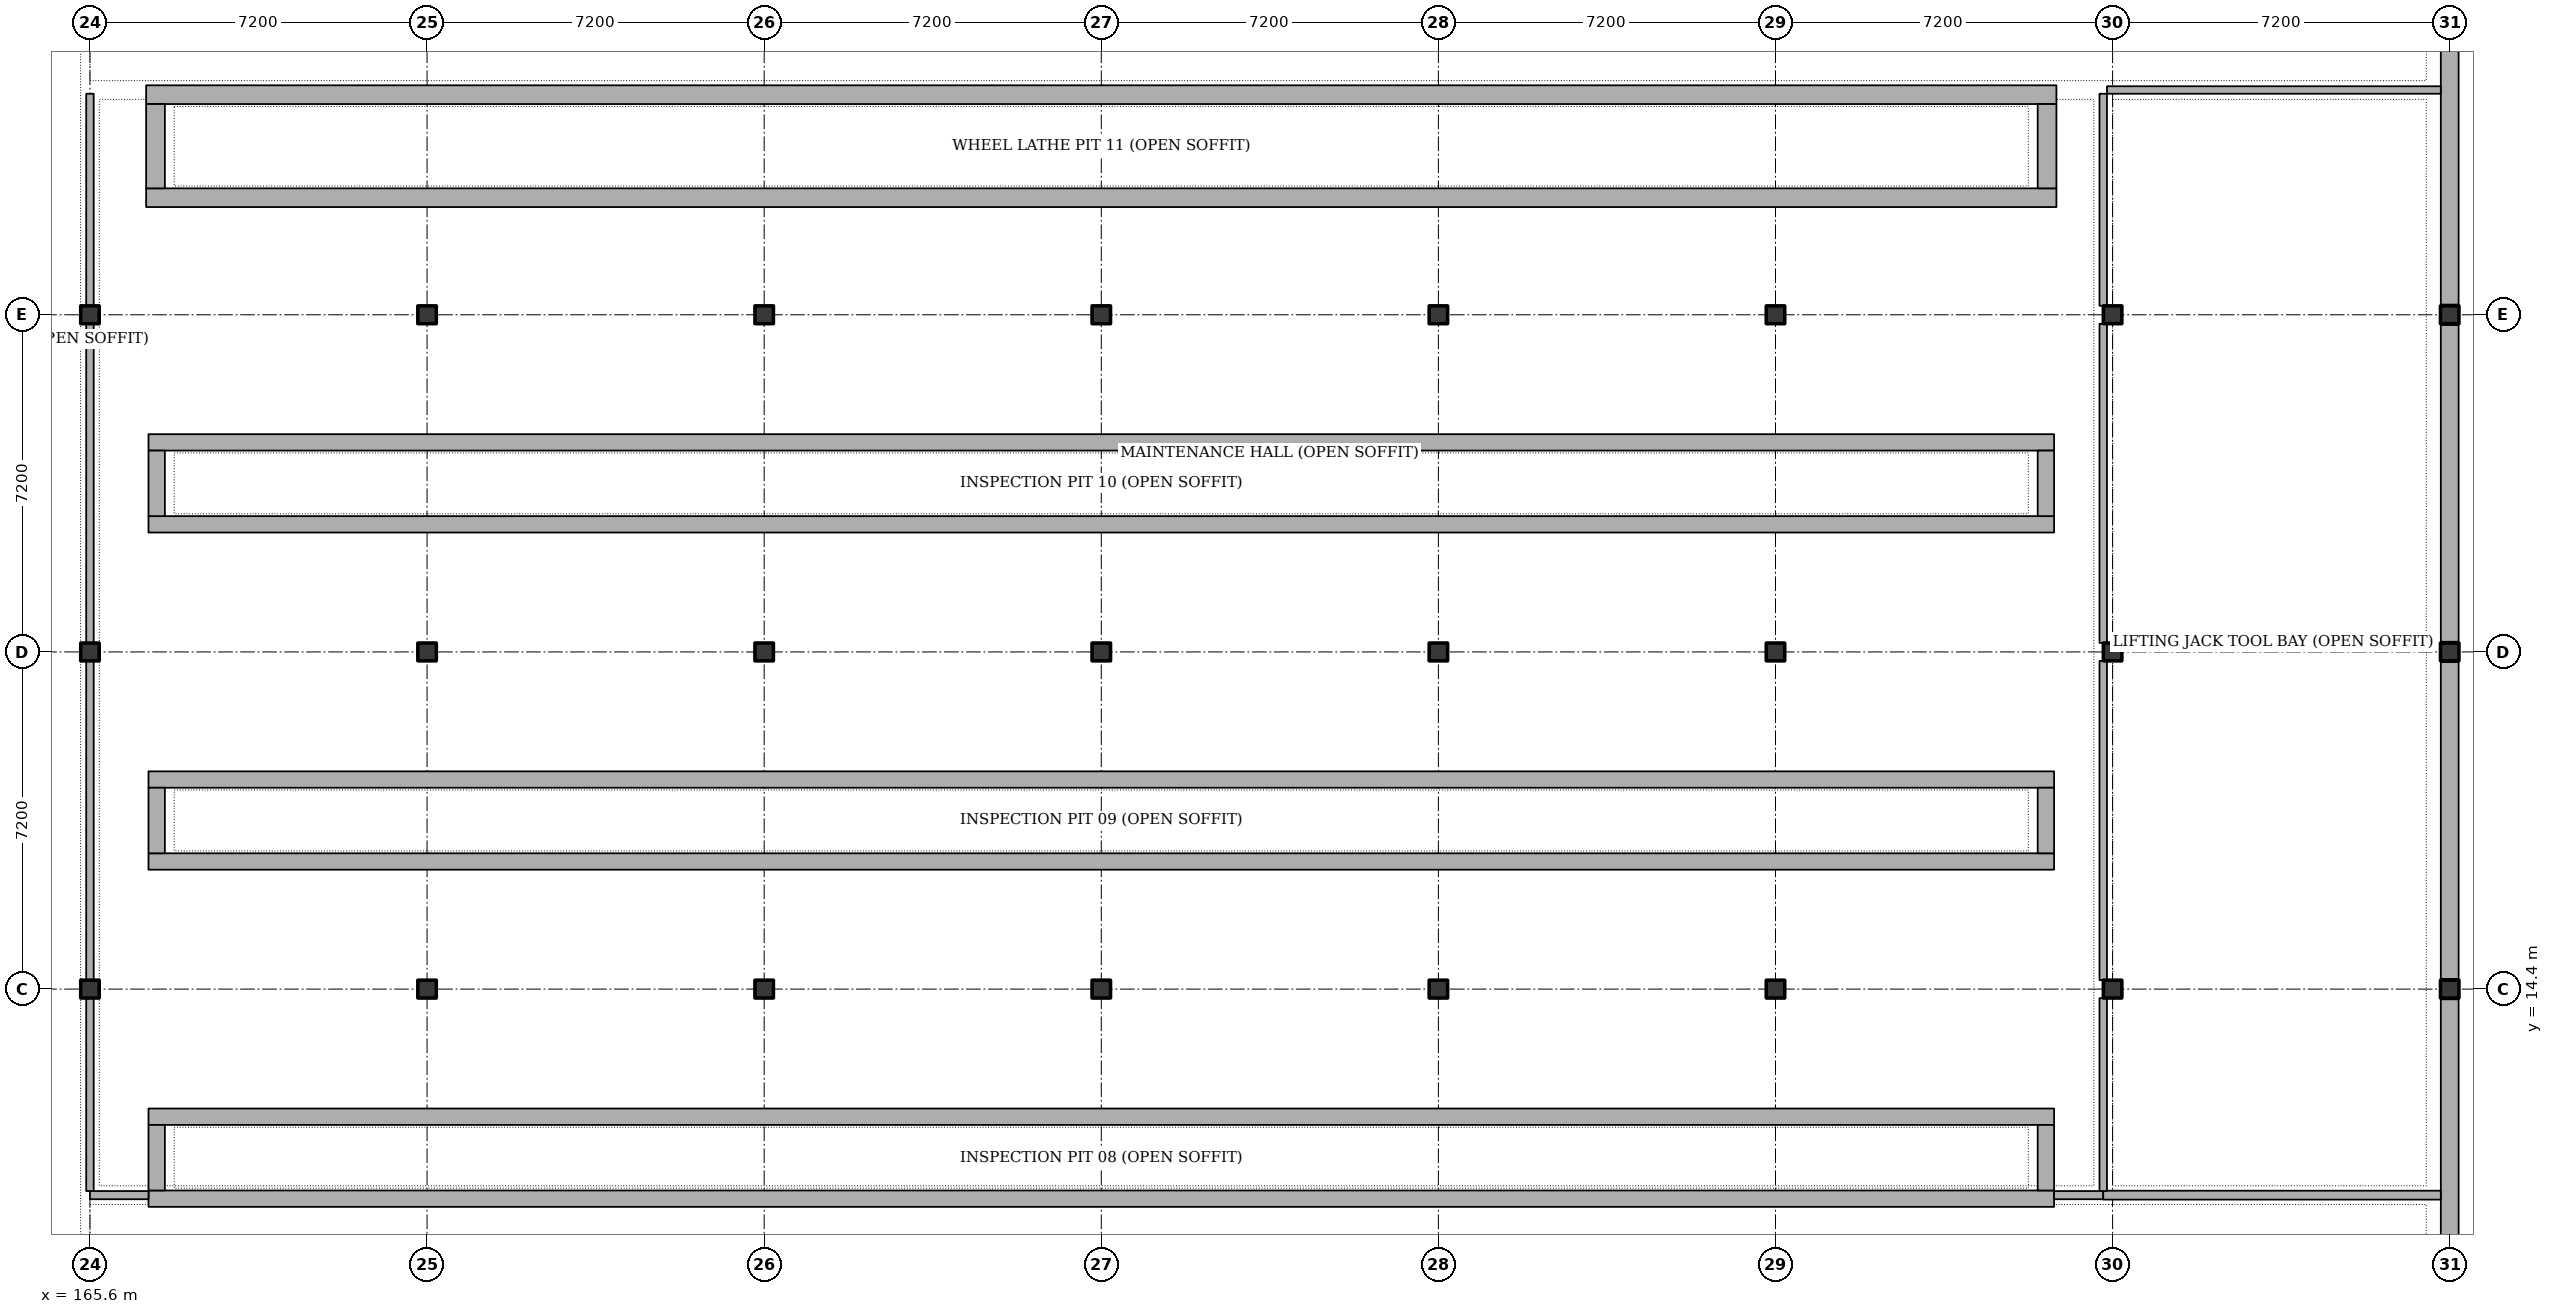
"""IFC4 building model, lengths in metres.
Left out: names, types, materials, properties, quantities, classifications, styles, units other than length and angle.
Written with IfcOpenShell. Run it as: python <this file> out.ifc"""

import sys

from ifc_helpers import new_model, si_unit, direction, frame, frame_2d, origin, origin_2d, place, context, subcontext, project, spatial, rectangle, i_section, extrude, element, fill, save


model = new_model("IFC4")
c1 = context("Model", 3, precision=1e-05, world=origin(), true_north=direction((0.0, 1.0)))
c2 = subcontext(c1, "Body", "Model", "MODEL_VIEW")
j1 = project(units=[si_unit("LENGTHUNIT", "METRE"), si_unit("PLANEANGLEUNIT", "RADIAN")], contexts=[c1])
p1 = place(None, origin())
s1 = spatial("IfcSite", under=j1, at=p1, CompositionType="ELEMENT")
p2 = place(p1, origin())
s2 = spatial("IfcBuilding", under=s1, at=p2, CompositionType="ELEMENT")
p3 = place(p2, origin())
s3 = spatial("IfcBuildingStorey", under=s2, at=p3, CompositionType="ELEMENT", Elevation=0.0)
for number, where, z_axis, x_axis in (
    (1, (166.85, 11.675, -1.55), (0.0, 0.0, 1.0), (1.0, 0.0, 0.0)),
    (2, (166.85, 9.925, -1.55), (0.0, 0.0, 1.0), (1.0, 0.0, 0.0)),
):
    element("IfcWall", number, at=place(p3, frame(where, z_axis=z_axis, x_axis=x_axis)), inside=s3, PredefinedType="USERDEFINED", context=c2, shape_type="SweptSolid", body=[
        extrude(rectangle(XDim=40.7, YDim=0.35, at=frame_2d((20.35, 0.0))), origin(), (0.0, 0.0, 1.0), 1.55),
    ])
for number, where, z_axis, x_axis in (
    (3, (167.025, 10.1, -1.55), (0.0, 0.0, 1.0), (0.0, 1.0, 0.0)),
    (4, (207.375, 10.1, -1.55), (0.0, 0.0, 1.0), (0.0, 1.0, 0.0)),
):
    element("IfcWall", number, at=place(p3, frame(where, z_axis=z_axis, x_axis=x_axis)), inside=s3, PredefinedType="USERDEFINED", context=c2, shape_type="SweptSolid", body=[
        extrude(rectangle(XDim=1.4, YDim=0.35, at=frame_2d((0.7, 0.0))), origin(), (0.0, 0.0, 1.0), 1.55),
    ])
for number, where, z_axis, x_axis in (
    (5, (166.85, 18.875, -1.55), (0.0, 0.0, 1.0), (1.0, 0.0, 0.0)),
    (6, (166.85, 17.125, -1.55), (0.0, 0.0, 1.0), (1.0, 0.0, 0.0)),
):
    element("IfcWall", number, at=place(p3, frame(where, z_axis=z_axis, x_axis=x_axis)), inside=s3, PredefinedType="USERDEFINED", context=c2, shape_type="SweptSolid", body=[
        extrude(rectangle(XDim=40.7, YDim=0.35, at=frame_2d((20.35, 0.0))), origin(), (0.0, 0.0, 1.0), 1.55),
    ])
for number, where, z_axis, x_axis in (
    (7, (167.025, 17.3, -1.55), (0.0, 0.0, 1.0), (0.0, 1.0, 0.0)),
    (8, (207.375, 17.3, -1.55), (0.0, 0.0, 1.0), (0.0, 1.0, 0.0)),
):
    element("IfcWall", number, at=place(p3, frame(where, z_axis=z_axis, x_axis=x_axis)), inside=s3, PredefinedType="USERDEFINED", context=c2, shape_type="SweptSolid", body=[
        extrude(rectangle(XDim=1.4, YDim=0.35, at=frame_2d((0.7, 0.0))), origin(), (0.0, 0.0, 1.0), 1.55),
    ])
for number, where, z_axis, x_axis in (
    (9, (166.85, 26.075, -1.55), (0.0, 0.0, 1.0), (1.0, 0.0, 0.0)),
    (10, (166.85, 24.325, -1.55), (0.0, 0.0, 1.0), (1.0, 0.0, 0.0)),
):
    element("IfcWall", number, at=place(p3, frame(where, z_axis=z_axis, x_axis=x_axis)), inside=s3, PredefinedType="USERDEFINED", context=c2, shape_type="SweptSolid", body=[
        extrude(rectangle(XDim=40.7, YDim=0.35, at=frame_2d((20.35, 0.0))), origin(), (0.0, 0.0, 1.0), 1.55),
    ])
for number, where, z_axis, x_axis in (
    (11, (167.025, 24.5, -1.55), (0.0, 0.0, 1.0), (0.0, 1.0, 0.0)),
    (12, (207.375, 24.5, -1.55), (0.0, 0.0, 1.0), (0.0, 1.0, 0.0)),
):
    element("IfcWall", number, at=place(p3, frame(where, z_axis=z_axis, x_axis=x_axis)), inside=s3, PredefinedType="USERDEFINED", context=c2, shape_type="SweptSolid", body=[
        extrude(rectangle(XDim=1.4, YDim=0.35, at=frame_2d((0.7, 0.0))), origin(), (0.0, 0.0, 1.0), 1.55),
    ])
for number, where, z_axis, x_axis in (
    (13, (166.8, 33.5, -2.2), (0.0, 0.0, 1.0), (1.0, 0.0, 0.0)),
    (14, (166.8, 31.3, -2.2), (0.0, 0.0, 1.0), (1.0, 0.0, 0.0)),
):
    element("IfcWall", number, at=place(p3, frame(where, z_axis=z_axis, x_axis=x_axis)), inside=s3, PredefinedType="USERDEFINED", context=c2, shape_type="SweptSolid", body=[
        extrude(rectangle(XDim=40.8, YDim=0.4, at=frame_2d((20.4, 0.0))), origin(), (0.0, 0.0, 1.0), 2.2),
    ])
for number, where, z_axis, x_axis in (
    (15, (167.0, 31.5, -2.2), (0.0, 0.0, 1.0), (0.0, 1.0, 0.0)),
    (16, (207.4, 31.5, -2.2), (0.0, 0.0, 1.0), (0.0, 1.0, 0.0)),
):
    element("IfcWall", number, at=place(p3, frame(where, z_axis=z_axis, x_axis=x_axis)), inside=s3, PredefinedType="USERDEFINED", context=c2, shape_type="SweptSolid", body=[
        extrude(rectangle(XDim=1.8, YDim=0.4, at=frame_2d((0.9, 0.0))), origin(), (0.0, 0.0, 1.0), 2.2),
    ])
for number, where, z_axis, x_axis in (
    (17, (165.6, 14.4, -0.3), (0.0, 0.0, 1.0), (1.0, 0.0, 0.0)),
    (18, (165.6, 21.6, -0.3), (0.0, 0.0, 1.0), (1.0, 0.0, 0.0)),
    (19, (165.6, 28.8, -0.3), (0.0, 0.0, 1.0), (1.0, 0.0, 0.0)),
    (20, (172.8, 14.4, -0.3), (0.0, 0.0, 1.0), (1.0, 0.0, 0.0)),
    (21, (172.8, 21.6, -0.3), (0.0, 0.0, 1.0), (1.0, 0.0, 0.0)),
    (22, (172.8, 28.8, -0.3), (0.0, 0.0, 1.0), (1.0, 0.0, 0.0)),
    (23, (180.0, 14.4, -0.3), (0.0, 0.0, 1.0), (1.0, 0.0, 0.0)),
    (24, (180.0, 21.6, -0.3), (0.0, 0.0, 1.0), (1.0, 0.0, 0.0)),
    (25, (180.0, 28.8, -0.3), (0.0, 0.0, 1.0), (1.0, 0.0, 0.0)),
    (26, (187.2, 14.4, -0.3), (0.0, 0.0, 1.0), (1.0, 0.0, 0.0)),
    (27, (187.2, 21.6, -0.3), (0.0, 0.0, 1.0), (1.0, 0.0, 0.0)),
    (28, (187.2, 28.8, -0.3), (0.0, 0.0, 1.0), (1.0, 0.0, 0.0)),
    (29, (194.4, 14.4, -0.3), (0.0, 0.0, 1.0), (1.0, 0.0, 0.0)),
    (30, (194.4, 21.6, -0.3), (0.0, 0.0, 1.0), (1.0, 0.0, 0.0)),
    (31, (194.4, 28.8, -0.3), (0.0, 0.0, 1.0), (1.0, 0.0, 0.0)),
    (32, (201.6, 14.4, -0.3), (0.0, 0.0, 1.0), (1.0, 0.0, 0.0)),
    (33, (201.6, 21.6, -0.3), (0.0, 0.0, 1.0), (1.0, 0.0, 0.0)),
    (34, (201.6, 28.8, -0.3), (0.0, 0.0, 1.0), (1.0, 0.0, 0.0)),
    (35, (208.8, 14.4, -0.3), (0.0, 0.0, 1.0), (1.0, 0.0, 0.0)),
    (36, (208.8, 21.6, -0.3), (0.0, 0.0, 1.0), (1.0, 0.0, 0.0)),
    (37, (208.8, 28.8, -0.3), (0.0, 0.0, 1.0), (1.0, 0.0, 0.0)),
    (38, (216.0, 14.4, -0.3), (0.0, 0.0, 1.0), (1.0, 0.0, 0.0)),
    (39, (216.0, 21.6, -0.3), (0.0, 0.0, 1.0), (1.0, 0.0, 0.0)),
    (40, (216.0, 28.8, -0.3), (0.0, 0.0, 1.0), (1.0, 0.0, 0.0)),
):
    element("IfcColumn", number, at=place(p3, frame(where, z_axis=z_axis, x_axis=x_axis)), inside=s3, PredefinedType="COLUMN", context=c2, shape_type="SweptSolid", body=[
        extrude(i_section(OverallWidth=0.395, OverallDepth=0.381, WebThickness=0.018, FlangeThickness=0.03, FilletRadius=0.015, at=origin_2d()), origin(), (0.0, 0.0, 1.0), 5.7),
    ])
p4 = place(p3, frame((216.0, 35.783, 0.0), z_axis=(0.0, 0.0, 1.0), x_axis=(0.0, -1.0, 0.0)))
e41 = element("IfcWall", 41, at=p4, inside=s3, PredefinedType="SOLIDWALL", context=c2, shape_type="SweptSolid", body=[
    extrude(rectangle(XDim=6.765, YDim=0.38, at=frame_2d((3.383, 0.0))), origin(), (0.0, 0.0, 1.0), 4.413),
])
p5 = place(p4, frame((1.583, 0.0, 0.0)))
e42 = element("IfcOpeningElement", 42, at=p5, cuts=e41, PredefinedType="OPENING", context=c2, shape_type="SweptSolid", body=[
    extrude(rectangle(XDim=3.6, YDim=4.2, at=frame_2d((1.8, 2.1))), frame((0.0, 0.2, 0.0), z_axis=(0.0, -1.0, 0.0), x_axis=(1.0, 0.0, 0.0)), (0.0, 0.0, 1.0), 0.4),
])
p6 = place(p3, frame((216.0, 28.583, 0.0), z_axis=(0.0, 0.0, 1.0), x_axis=(0.0, -1.0, 0.0)))
e43 = element("IfcWall", 43, at=p6, inside=s3, PredefinedType="SOLIDWALL", context=c2, shape_type="SweptSolid", body=[
    extrude(rectangle(XDim=6.765, YDim=0.38, at=frame_2d((3.383, 0.0))), origin(), (0.0, 0.0, 1.0), 4.413),
])
p7 = place(p6, frame((2.733, 0.0, 1.05)))
e44 = element("IfcOpeningElement", 44, at=p7, cuts=e43, PredefinedType="OPENING", context=c2, shape_type="SweptSolid", body=[
    extrude(rectangle(XDim=1.3, YDim=1.6, at=frame_2d((0.65, 0.8))), frame((0.0, 0.2, 0.0), z_axis=(0.0, -1.0, 0.0), x_axis=(1.0, 0.0, 0.0)), (0.0, 0.0, 1.0), 0.4),
])
p8 = place(p3, frame((216.0, 21.383, 0.0), z_axis=(0.0, 0.0, 1.0), x_axis=(0.0, -1.0, 0.0)))
e45 = element("IfcWall", 45, at=p8, inside=s3, PredefinedType="SOLIDWALL", context=c2, shape_type="SweptSolid", body=[
    extrude(rectangle(XDim=6.765, YDim=0.38, at=frame_2d((3.383, 0.0))), origin(), (0.0, 0.0, 1.0), 4.413),
])
p9 = place(p8, frame((1.583, 0.0, 0.0)))
e46 = element("IfcOpeningElement", 46, at=p9, cuts=e45, PredefinedType="OPENING", context=c2, shape_type="SweptSolid", body=[
    extrude(rectangle(XDim=3.6, YDim=4.2, at=frame_2d((1.8, 2.1))), frame((0.0, 0.2, 0.0), z_axis=(0.0, -1.0, 0.0), x_axis=(1.0, 0.0, 0.0)), (0.0, 0.0, 1.0), 0.4),
])
p10 = place(p3, frame((216.0, 14.183, 0.0), z_axis=(0.0, 0.0, 1.0), x_axis=(0.0, -1.0, 0.0)))
e47 = element("IfcWall", 47, at=p10, inside=s3, PredefinedType="SOLIDWALL", context=c2, shape_type="SweptSolid", body=[
    extrude(rectangle(XDim=6.765, YDim=0.38, at=frame_2d((3.383, 0.0))), origin(), (0.0, 0.0, 1.0), 4.413),
])
p11 = place(p10, frame((1.066, 0.0, 1.05)))
e48 = element("IfcOpeningElement", 48, at=p11, cuts=e47, PredefinedType="OPENING", context=c2, shape_type="SweptSolid", body=[
    extrude(rectangle(XDim=2.2, YDim=1.35, at=frame_2d((1.1, 0.675))), frame((0.0, 0.2, 0.0), z_axis=(0.0, -1.0, 0.0), x_axis=(1.0, 0.0, 0.0)), (0.0, 0.0, 1.0), 0.4),
])
p12 = place(p3, frame((165.6, 10.0, 0.0), z_axis=(0.0, 0.0, 1.0), x_axis=(1.0, 0.0, 0.0)))
e49 = element("IfcWall", 49, at=p12, inside=s3, PredefinedType="PARTITIONING", context=c2, shape_type="SweptSolid", body=[
    extrude(rectangle(XDim=1.25, YDim=0.175, at=frame_2d((0.625, 0.0))), origin(), (0.0, 0.0, 1.0), 3.55),
])
p13 = place(p12, frame((0.25, 0.0, 0.0)))
e50 = element("IfcOpeningElement", 50, at=p13, cuts=e49, PredefinedType="OPENING", context=c2, shape_type="SweptSolid", body=[
    extrude(rectangle(XDim=0.88, YDim=2.05, at=frame_2d((0.44, 1.025))), frame((0.0, 0.097, 0.0), z_axis=(0.0, -1.0, 0.0), x_axis=(1.0, 0.0, 0.0)), (0.0, 0.0, 1.0), 0.195),
])
p14 = place(p3, frame((207.55, 10.0, 0.0), z_axis=(0.0, 0.0, 1.0), x_axis=(1.0, 0.0, 0.0)))
e51 = element("IfcWall", 51, at=p14, inside=s3, PredefinedType="PARTITIONING", context=c2, shape_type="SweptSolid", body=[
    extrude(rectangle(XDim=1.05, YDim=0.175, at=frame_2d((0.525, 0.0))), origin(), (0.0, 0.0, 1.0), 3.55),
])
p15 = place(p3, frame((208.6, 10.0, 0.0), z_axis=(0.0, 0.0, 1.0), x_axis=(1.0, 0.0, 0.0)))
e52 = element("IfcWall", 52, at=p15, inside=s3, PredefinedType="PARTITIONING", context=c2, shape_type="SweptSolid", body=[
    extrude(rectangle(XDim=7.21, YDim=0.19, at=frame_2d((3.605, 0.0))), origin(), (0.0, 0.0, 1.0), 3.55),
])
p16 = place(p15, frame((2.675, 0.0, 0.0)))
e53 = element("IfcOpeningElement", 53, at=p16, cuts=e52, PredefinedType="OPENING", context=c2, shape_type="SweptSolid", body=[
    extrude(rectangle(XDim=1.75, YDim=2.25, at=frame_2d((0.875, 1.125))), frame((0.0, 0.105, 0.0), z_axis=(0.0, -1.0, 0.0), x_axis=(1.0, 0.0, 0.0)), (0.0, 0.0, 1.0), 0.21),
])
p17 = place(p3, frame((165.6, 10.088, 0.0), z_axis=(0.0, 0.0, 1.0), x_axis=(0.0, 1.0, 0.0)))
e54 = element("IfcWall", 54, at=p17, inside=s3, PredefinedType="PARTITIONING", context=c2, shape_type="SweptSolid", body=[
    extrude(rectangle(XDim=4.119, YDim=0.16, at=frame_2d((2.06, 0.0))), origin(), (0.0, 0.0, 1.0), 3.55),
])
for number, where, z_axis, x_axis in (
    (55, (165.6, 14.593, 0.0), (0.0, 0.0, 1.0), (0.0, 1.0, 0.0)),
    (56, (165.6, 21.793, 0.0), (0.0, 0.0, 1.0), (0.0, 1.0, 0.0)),
):
    element("IfcWall", number, at=place(p3, frame(where, z_axis=z_axis, x_axis=x_axis)), inside=s3, PredefinedType="PARTITIONING", context=c2, shape_type="SweptSolid", body=[
        extrude(rectangle(XDim=6.815, YDim=0.16, at=frame_2d((3.407, 0.0))), origin(), (0.0, 0.0, 1.0), 3.55),
    ])
p18 = place(p3, frame((165.6, 28.992, 0.0), z_axis=(0.0, 0.0, 1.0), x_axis=(0.0, 1.0, 0.0)))
e57 = element("IfcWall", 57, at=p18, inside=s3, PredefinedType="PARTITIONING", context=c2, shape_type="SweptSolid", body=[
    extrude(rectangle(XDim=4.528, YDim=0.16, at=frame_2d((2.264, 0.0))), origin(), (0.0, 0.0, 1.0), 3.55),
])
p19 = place(p3, frame((208.6, 10.088, 0.0), z_axis=(0.0, 0.0, 1.0), x_axis=(0.0, 1.0, 0.0)))
e58 = element("IfcWall", 58, at=p19, inside=s3, PredefinedType="PARTITIONING", context=c2, shape_type="SweptSolid", body=[
    extrude(rectangle(XDim=4.119, YDim=0.16, at=frame_2d((2.06, 0.0))), origin(), (0.0, 0.0, 1.0), 3.55),
])
for number, where, z_axis, x_axis in (
    (59, (208.6, 14.593, 0.0), (0.0, 0.0, 1.0), (0.0, 1.0, 0.0)),
    (60, (208.6, 21.793, 0.0), (0.0, 0.0, 1.0), (0.0, 1.0, 0.0)),
):
    element("IfcWall", number, at=place(p3, frame(where, z_axis=z_axis, x_axis=x_axis)), inside=s3, PredefinedType="PARTITIONING", context=c2, shape_type="SweptSolid", body=[
        extrude(rectangle(XDim=6.815, YDim=0.16, at=frame_2d((3.407, 0.0))), origin(), (0.0, 0.0, 1.0), 3.55),
    ])
p20 = place(p3, frame((208.6, 28.992, 0.0), z_axis=(0.0, 0.0, 1.0), x_axis=(0.0, 1.0, 0.0)))
e61 = element("IfcWall", 61, at=p20, inside=s3, PredefinedType="PARTITIONING", context=c2, shape_type="SweptSolid", body=[
    extrude(rectangle(XDim=4.528, YDim=0.16, at=frame_2d((2.264, 0.0))), origin(), (0.0, 0.0, 1.0), 3.55),
])
p21 = place(p3, frame((208.68, 33.6, 0.0), z_axis=(0.0, 0.0, 1.0), x_axis=(1.0, 0.0, 0.0)))
e62 = element("IfcWall", 62, at=p21, inside=s3, PredefinedType="PARTITIONING", context=c2, shape_type="SweptSolid", body=[
    extrude(rectangle(XDim=7.13, YDim=0.16, at=frame_2d((3.565, 0.0))), origin(), (0.0, 0.0, 1.0), 3.55),
])
p22 = place(p7, origin())
e63 = element("IfcWindow", 63, at=p22, inside=s3, PartitioningType="SINGLE_PANEL", PredefinedType="WINDOW", context=c2, shape_type="SweptSolid", body=[
    extrude(rectangle(XDim=1.3, YDim=1.6, at=frame_2d((0.65, 0.8))), frame((0.0, 0.03, 0.0), z_axis=(0.0, -1.0, 0.0), x_axis=(1.0, 0.0, 0.0)), (0.0, 0.0, 1.0), 0.06),
])
fill(e44, e63)
p23 = place(p11, origin())
e64 = element("IfcWindow", 64, at=p23, inside=s3, PartitioningType="SINGLE_PANEL", PredefinedType="WINDOW", context=c2, shape_type="SweptSolid", body=[
    extrude(rectangle(XDim=2.2, YDim=1.35, at=frame_2d((1.1, 0.675))), frame((0.0, 0.03, 0.0), z_axis=(0.0, -1.0, 0.0), x_axis=(1.0, 0.0, 0.0)), (0.0, 0.0, 1.0), 0.06),
])
fill(e48, e64)
p24 = place(p9, origin())
e65 = element("IfcDoor", 65, at=p24, inside=s3, OperationType="ROLLINGUP", PredefinedType="GATE", context=c2, shape_type="SweptSolid", body=[
    extrude(rectangle(XDim=3.6, YDim=4.2, at=frame_2d((1.8, 2.1))), frame((0.0, 0.025, 0.0), z_axis=(0.0, -1.0, 0.0), x_axis=(1.0, 0.0, 0.0)), (0.0, 0.0, 1.0), 0.05),
])
fill(e46, e65)
p25 = place(p5, origin())
e66 = element("IfcDoor", 66, at=p25, inside=s3, OperationType="ROLLINGUP", PredefinedType="GATE", context=c2, shape_type="SweptSolid", body=[
    extrude(rectangle(XDim=3.6, YDim=4.2, at=frame_2d((1.8, 2.1))), frame((0.0, 0.025, 0.0), z_axis=(0.0, -1.0, 0.0), x_axis=(1.0, 0.0, 0.0)), (0.0, 0.0, 1.0), 0.05),
])
fill(e42, e66)
p26 = place(p13, origin())
e67 = element("IfcDoor", 67, at=p26, inside=s3, OperationType="SINGLE_SWING_RIGHT", PredefinedType="DOOR", context=c2, shape_type="SweptSolid", body=[
    extrude(rectangle(XDim=0.88, YDim=2.05, at=frame_2d((0.44, 1.025))), frame((0.0, 0.025, 0.0), z_axis=(0.0, -1.0, 0.0), x_axis=(1.0, 0.0, 0.0)), (0.0, 0.0, 1.0), 0.05),
])
fill(e50, e67)
p27 = place(p16, origin())
e68 = element("IfcDoor", 68, at=p27, inside=s3, OperationType="DOUBLE_SWING_LEFT", PredefinedType="DOOR", context=c2, shape_type="SweptSolid", body=[
    extrude(rectangle(XDim=1.75, YDim=2.25, at=frame_2d((0.875, 1.125))), frame((0.0, 0.025, 0.0), z_axis=(0.0, -1.0, 0.0), x_axis=(1.0, 0.0, 0.0)), (0.0, 0.0, 1.0), 0.05),
])
fill(e53, e68)
save(model, sys.argv[1])
